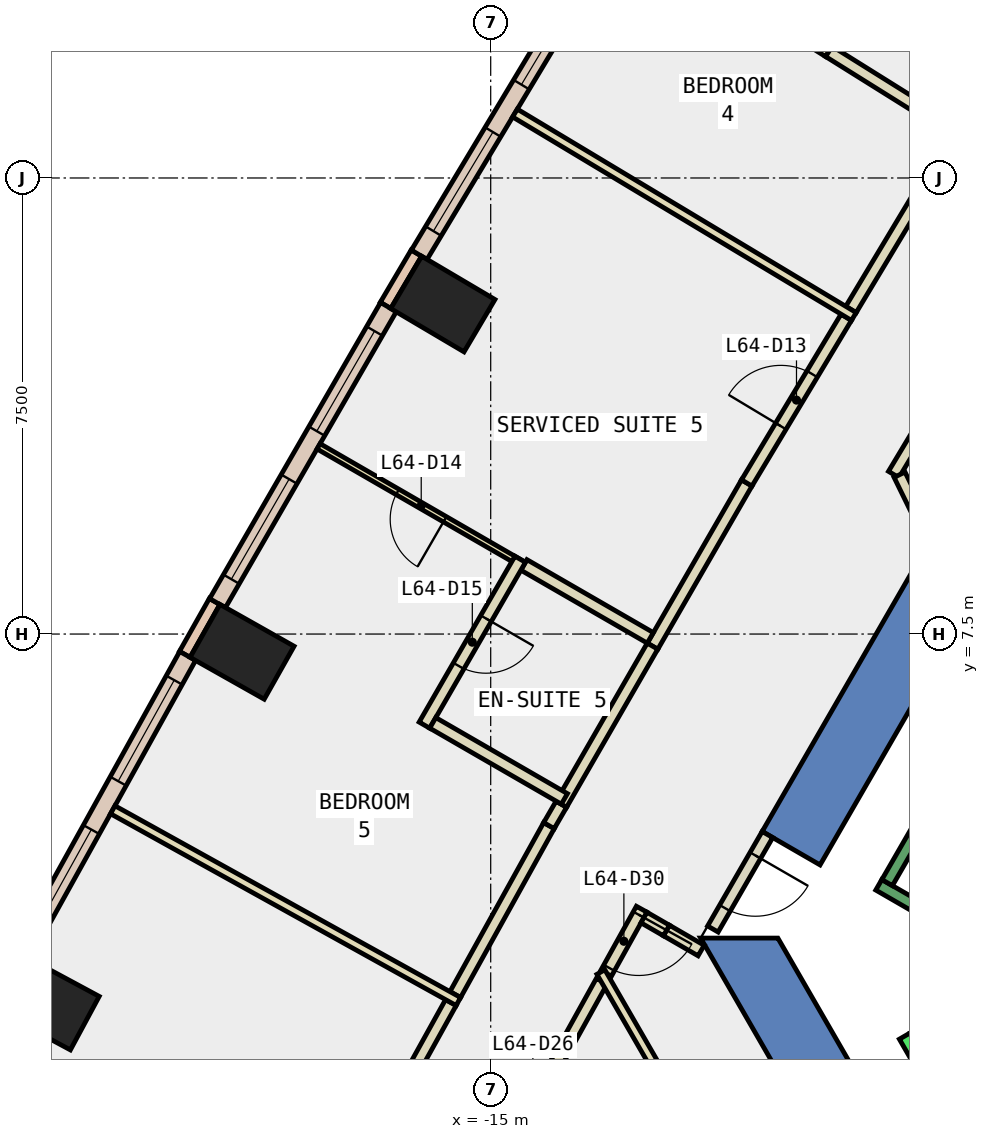
"""IFC4 building model, lengths in metres.
Left out: names, types, materials, properties, quantities, classifications, styles, units other than length and angle.
Written with IfcOpenShell. Run it as: python <this file> out.ifc"""

import sys

from ifc_helpers import new_model, si_unit, direction, frame, frame_2d, origin, origin_2d, place, context, subcontext, project, spatial, polyline, rectangle, outline, extrude, element, fill, save


model = new_model("IFC4")
c1 = context("Model", 3, precision=1e-05, world=origin(), true_north=direction((0.0, 1.0)))
c2 = subcontext(c1, "Body", "Model", "MODEL_VIEW")
j1 = project(units=[si_unit("LENGTHUNIT", "METRE"), si_unit("PLANEANGLEUNIT", "RADIAN")], contexts=[c1])
p1 = place(None, origin())
s1 = spatial("IfcSite", under=j1, at=p1, CompositionType="ELEMENT")
p2 = place(p1, origin())
s2 = spatial("IfcBuilding", under=s1, at=p2, CompositionType="ELEMENT")
p3 = place(p2, frame((0.0, 0.0, 277.4)))
s3 = spatial("IfcBuildingStorey", under=s2, at=p3, CompositionType="ELEMENT", Elevation=277.4)
for number, where, z_axis, x_axis in (
    (1, (-15.787, 12.927, -0.34), (0.0, 0.0, 1.0), (0.509, 0.861, 0.0)),
    (2, (-19.089, 7.208, -0.34), (0.0, 0.0, 1.0), (0.491, 0.871, 0.0)),
    (3, (-22.292, 1.433, -0.34), (0.0, 0.0, 1.0), (0.474, 0.881, 0.0)),
):
    element("IfcColumn", number, at=place(p3, frame(where, z_axis=z_axis, x_axis=x_axis)), inside=s3, PredefinedType="COLUMN", context=c2, shape_type="SweptSolid", body=[
        extrude(rectangle(XDim=1.0, YDim=1.4, at=origin_2d()), origin(), (0.0, 0.0, 1.0), 3.34),
    ])
p4 = place(p3, frame((0.0, 0.0, -0.34)))
e4 = element("IfcWall", 4, at=p4, inside=s3, PredefinedType="SHEAR", context=c2, shape_type="SweptSolid", body=[
    extrude(outline(polyline([(-10.535, 4.253), (-9.583, 3.703), (-5.138, 11.4), (-5.774, 12.5), (-10.535, 4.253)])), origin(), (0.0, 0.0, 1.0), 3.34),
])
p5 = place(p3, frame((0.0, 0.0, -0.34)))
e5 = element("IfcWall", 5, at=p5, inside=s3, PredefinedType="SHEAR", context=c2, shape_type="SweptSolid", body=[
    extrude(outline(polyline([(-11.547, 2.5), (-5.774, -7.5), (-5.138, -6.4), (-10.277, 2.5), (-11.547, 2.5)])), origin(), (0.0, 0.0, 1.0), 3.34),
])
p6 = place(p3, frame((-16.222, 13.765, 0.0), z_axis=(0.0, 0.0, 1.0), x_axis=(-0.508268432768, -0.861198699634, 0.0)))
e6 = element("IfcWall", 6, at=p6, inside=s3, PredefinedType="STANDARD", context=c2, shape_type="SweptSolid", body=[
    extrude(rectangle(XDim=1.0, YDim=0.2, at=frame_2d((0.5, 0.0))), origin(), (0.0, 0.0, 1.0), 3.0),
])
p7 = place(p3, frame((-19.54, 8.036, 0.0), z_axis=(0.0, 0.0, 1.0), x_axis=(-0.491848119507, -0.870681013539, 0.0)))
e7 = element("IfcWall", 7, at=p7, inside=s3, PredefinedType="STANDARD", context=c2, shape_type="SweptSolid", body=[
    extrude(rectangle(XDim=1.0, YDim=0.2, at=frame_2d((0.5, 0.0))), origin(), (0.0, 0.0, 1.0), 3.0),
])
p8 = place(p3, frame((-13.282, 18.554, 0.0), z_axis=(0.0, 0.0, 1.0), x_axis=(-0.515006791362, -0.857186096977, 0.0)))
e8 = element("IfcWall", 8, at=p8, inside=s3, PredefinedType="STANDARD", context=c2, shape_type="SweptSolid", body=[
    extrude(rectangle(XDim=5.619, YDim=0.3, at=frame_2d((2.81, 0.0))), origin(), (0.0, 0.0, 1.0), 3.0),
])
p9 = place(p8, frame((0.455, 0.0, 0.9)))
e9 = element("IfcOpeningElement", 9, at=p9, cuts=e8, PredefinedType="OPENING", context=c2, shape_type="SweptSolid", body=[
    extrude(rectangle(XDim=1.9, YDim=2.0, at=frame_2d((0.95, 1.0))), frame((0.0, 0.16, 0.0), z_axis=(0.0, -1.0, 0.0), x_axis=(1.0, 0.0, 0.0)), (0.0, 0.0, 1.0), 0.32),
])
p10 = place(p8, frame((3.265, 0.0, 0.9)))
e10 = element("IfcOpeningElement", 10, at=p10, cuts=e8, PredefinedType="OPENING", context=c2, shape_type="SweptSolid", body=[
    extrude(rectangle(XDim=1.9, YDim=2.0, at=frame_2d((0.95, 1.0))), frame((0.0, 0.16, 0.0), z_axis=(0.0, -1.0, 0.0), x_axis=(1.0, 0.0, 0.0)), (0.0, 0.0, 1.0), 0.32),
])
p11 = place(p3, frame((-16.682, 12.877, 0.0), z_axis=(0.0, 0.0, 1.0), x_axis=(-0.49999685976, -0.866027216796, 0.0)))
e11 = element("IfcWall", 11, at=p11, inside=s3, PredefinedType="STANDARD", context=c2, shape_type="SweptSolid", body=[
    extrude(rectangle(XDim=5.622, YDim=0.3, at=frame_2d((2.811, 0.0))), origin(), (0.0, 0.0, 1.0), 3.0),
])
p12 = place(p11, frame((0.456, 0.0, 0.9)))
e12 = element("IfcOpeningElement", 12, at=p12, cuts=e11, PredefinedType="OPENING", context=c2, shape_type="SweptSolid", body=[
    extrude(rectangle(XDim=1.9, YDim=2.0, at=frame_2d((0.95, 1.0))), frame((0.0, 0.16, 0.0), z_axis=(0.0, -1.0, 0.0), x_axis=(1.0, 0.0, 0.0)), (0.0, 0.0, 1.0), 0.32),
])
p13 = place(p11, frame((3.267, 0.0, 0.9)))
e13 = element("IfcOpeningElement", 13, at=p13, cuts=e11, PredefinedType="OPENING", context=c2, shape_type="SweptSolid", body=[
    extrude(rectangle(XDim=1.9, YDim=2.0, at=frame_2d((0.95, 1.0))), frame((0.0, 0.16, 0.0), z_axis=(0.0, -1.0, 0.0), x_axis=(1.0, 0.0, 0.0)), (0.0, 0.0, 1.0), 0.32),
])
p14 = place(p3, frame((-19.984, 7.14, 0.0), z_axis=(0.0, 0.0, 1.0), x_axis=(-0.485049005017, -0.874486971162, 0.0)))
e14 = element("IfcWall", 14, at=p14, inside=s3, PredefinedType="STANDARD", context=c2, shape_type="SweptSolid", body=[
    extrude(rectangle(XDim=5.62, YDim=0.3, at=frame_2d((2.81, 0.0))), origin(), (0.0, 0.0, 1.0), 3.0),
])
p15 = place(p14, frame((0.455, 0.0, 0.9)))
e15 = element("IfcOpeningElement", 15, at=p15, cuts=e14, PredefinedType="OPENING", context=c2, shape_type="SweptSolid", body=[
    extrude(rectangle(XDim=1.9, YDim=2.0, at=frame_2d((0.95, 1.0))), frame((0.0, 0.16, 0.0), z_axis=(0.0, -1.0, 0.0), x_axis=(1.0, 0.0, 0.0)), (0.0, 0.0, 1.0), 0.32),
])
p16 = place(p14, frame((3.265, 0.0, 0.9)))
e16 = element("IfcOpeningElement", 16, at=p16, cuts=e14, PredefinedType="OPENING", context=c2, shape_type="SweptSolid", body=[
    extrude(rectangle(XDim=1.9, YDim=2.0, at=frame_2d((0.95, 1.0))), frame((0.0, 0.16, 0.0), z_axis=(0.0, -1.0, 0.0), x_axis=(1.0, 0.0, 0.0)), (0.0, 0.0, 1.0), 0.32),
])
p17 = place(p3, frame((-11.539, 2.295, 0.0), z_axis=(0.0, 0.0, 1.0), x_axis=(-0.86577241902, 0.500437926684, 0.0)))
e17 = element("IfcWall", 17, at=p17, inside=s3, PredefinedType="PARTITIONING", context=c2, shape_type="SweptSolid", body=[
    extrude(rectangle(XDim=0.66, YDim=0.2, at=frame_2d((0.33, 0.0))), origin(), (0.0, 0.0, 1.0), 2.4),
])
p18 = place(p3, frame((-12.517, 2.975, 0.0), z_axis=(0.0, 0.0, 1.0), x_axis=(-0.485195833999, -0.87440551386, 0.0)))
e18 = element("IfcWall", 18, at=p18, inside=s3, PredefinedType="PARTITIONING", context=c2, shape_type="SweptSolid", body=[
    extrude(rectangle(XDim=1.206, YDim=0.2, at=frame_2d((0.603, 0.0))), origin(), (0.0, 0.0, 1.0), 3.0),
])
p19 = place(p18, frame((0.103, 0.0, 0.0)))
e19 = element("IfcOpeningElement", 19, at=p19, cuts=e18, PredefinedType="OPENING", context=c2, shape_type="SweptSolid", body=[
    extrude(rectangle(XDim=1.0, YDim=2.1, at=frame_2d((0.5, 1.05))), frame((0.0, 0.11, 0.0), z_axis=(0.0, -1.0, 0.0), x_axis=(1.0, 0.0, 0.0)), (0.0, 0.0, 1.0), 0.22),
])
p20 = place(p3, frame((-5.885, 14.264, 0.0), z_axis=(0.0, 0.0, 1.0), x_axis=(-0.514971458129, -0.857207324579, 0.0)))
e20 = element("IfcWall", 20, at=p20, inside=s3, PredefinedType="PARTITIONING", context=c2, shape_type="SweptSolid", body=[
    extrude(rectangle(XDim=4.83, YDim=0.2, at=frame_2d((2.415, 0.0))), origin(), (0.0, 0.0, 1.0), 3.0),
])
p21 = place(p20, frame((1.915, 0.0, 0.0)))
e21 = element("IfcOpeningElement", 21, at=p21, cuts=e20, PredefinedType="OPENING", context=c2, shape_type="SweptSolid", body=[
    extrude(rectangle(XDim=1.0, YDim=2.1, at=frame_2d((0.5, 1.05))), frame((0.0, 0.11, 0.0), z_axis=(0.0, -1.0, 0.0), x_axis=(1.0, 0.0, 0.0)), (0.0, 0.0, 1.0), 0.22),
])
p22 = place(p3, frame((-8.276, 10.12, 0.0), z_axis=(0.0, 0.0, 1.0), x_axis=(0.440226122236, -0.897886942382, 0.0)))
e22 = element("IfcWall", 22, at=p22, inside=s3, PredefinedType="PARTITIONING", context=c2, shape_type="SweptSolid", body=[
    extrude(rectangle(XDim=1.176, YDim=0.2, at=frame_2d((0.588, 0.0))), origin(), (0.0, 0.0, 1.0), 3.0),
])
p23 = place(p3, frame((-13.174, 1.79, 0.0), z_axis=(0.0, 0.0, 1.0), x_axis=(-0.485079003918, -0.874470331091, 0.0)))
e23 = element("IfcWall", 23, at=p23, inside=s3, PredefinedType="PARTITIONING", context=c2, shape_type="SweptSolid", body=[
    extrude(rectangle(XDim=4.669, YDim=0.2, at=frame_2d((2.334, 0.0))), origin(), (0.0, 0.0, 1.0), 3.0),
])
p24 = place(p23, frame((1.834, 0.0, 0.0)))
e24 = element("IfcOpeningElement", 24, at=p24, cuts=e23, PredefinedType="OPENING", context=c2, shape_type="SweptSolid", body=[
    extrude(rectangle(XDim=1.0, YDim=2.1, at=frame_2d((0.5, 1.05))), frame((0.0, 0.11, 0.0), z_axis=(0.0, -1.0, 0.0), x_axis=(1.0, 0.0, 0.0)), (0.0, 0.0, 1.0), 0.22),
])
p25 = place(p3, frame((-9.075, 12.837, 0.0), z_axis=(0.0, 0.0, 1.0), x_axis=(0.514620055475, 0.857418333431, 0.0)))
e25 = element("IfcWall", 25, at=p25, inside=s3, PredefinedType="PARTITIONING", context=c2, shape_type="SweptSolid", body=[
    extrude(rectangle(XDim=3.177, YDim=0.2, at=frame_2d((1.588, 0.0))), origin(), (0.0, 0.0, 1.0), 3.0),
])
p26 = place(p3, frame((-12.338, 7.3, 0.0), z_axis=(0.0, 0.0, 1.0), x_axis=(0.4996633593, 0.866219676164, 0.0)))
e26 = element("IfcWall", 26, at=p26, inside=s3, PredefinedType="PARTITIONING", context=c2, shape_type="SweptSolid", body=[
    extrude(rectangle(XDim=3.1, YDim=0.2, at=frame_2d((1.55, 0.0))), origin(), (0.0, 0.0, 1.0), 3.0),
])
p27 = place(p3, frame((-10.789, 9.985, 0.0), z_axis=(0.0, 0.0, 1.0), x_axis=(0.51487988517, 0.857262330823, 0.0)))
e27 = element("IfcWall", 27, at=p27, inside=s3, PredefinedType="PARTITIONING", context=c2, shape_type="SweptSolid", body=[
    extrude(rectangle(XDim=3.177, YDim=0.2, at=frame_2d((1.589, 0.0))), origin(), (0.0, 0.0, 1.0), 3.0),
])
p28 = place(p27, frame((1.089, 0.0, 0.0)))
e28 = element("IfcOpeningElement", 28, at=p28, cuts=e27, PredefinedType="OPENING", context=c2, shape_type="SweptSolid", body=[
    extrude(rectangle(XDim=1.0, YDim=2.1, at=frame_2d((0.5, 1.05))), frame((0.0, 0.11, 0.0), z_axis=(0.0, -1.0, 0.0), x_axis=(1.0, 0.0, 0.0)), (0.0, 0.0, 1.0), 0.22),
])
p29 = place(p3, frame((-15.583, 1.571, 0.0), z_axis=(0.0, 0.0, 1.0), x_axis=(0.484944791944, 0.874544766588, 0.0)))
e29 = element("IfcWall", 29, at=p29, inside=s3, PredefinedType="PARTITIONING", context=c2, shape_type="SweptSolid", body=[
    extrude(rectangle(XDim=3.178, YDim=0.2, at=frame_2d((1.589, 0.0))), origin(), (0.0, 0.0, 1.0), 3.0),
])
p30 = place(p3, frame((-14.042, 4.35, 0.0), z_axis=(0.0, 0.0, 1.0), x_axis=(0.501816902032, 0.864973870608, 0.0)))
e30 = element("IfcWall", 30, at=p30, inside=s3, PredefinedType="PARTITIONING", context=c2, shape_type="SweptSolid", body=[
    extrude(rectangle(XDim=0.407, YDim=0.2, at=frame_2d((0.203, 0.0))), origin(), (0.0, 0.0, 1.0), 3.0),
])
p31 = place(p3, frame((-13.838, 4.702, 0.0), z_axis=(0.0, 0.0, 1.0), x_axis=(0.499543983968, 0.866288524731, 0.0)))
e31 = element("IfcWall", 31, at=p31, inside=s3, PredefinedType="PARTITIONING", context=c2, shape_type="SweptSolid", body=[
    extrude(rectangle(XDim=3.0, YDim=0.2, at=frame_2d((1.5, 0.0))), origin(), (0.0, 0.0, 1.0), 3.0),
])
p32 = place(p3, frame((-17.196, -1.338, 0.0), z_axis=(0.0, 0.0, 1.0), x_axis=(0.485107756493, 0.87445438108, 0.0)))
e32 = element("IfcWall", 32, at=p32, inside=s3, PredefinedType="PARTITIONING", context=c2, shape_type="SweptSolid", body=[
    extrude(rectangle(XDim=3.177, YDim=0.2, at=frame_2d((1.588, 0.0))), origin(), (0.0, 0.0, 1.0), 3.0),
])
p33 = place(p3, frame((-13.188, 1.942, 0.0), z_axis=(0.0, 0.0, 1.0), x_axis=(0.500061177503, -0.865990080056, 0.0)))
e33 = element("IfcWall", 33, at=p33, inside=s3, PredefinedType="PARTITIONING", context=c2, shape_type="SweptSolid", body=[
    extrude(rectangle(XDim=6.447, YDim=0.15, at=frame_2d((3.224, 0.0))), origin(), (0.0, 0.0, 1.0), 3.0),
])
p34 = place(p3, frame((-7.907, 19.72, 0.0), z_axis=(0.0, 0.0, 1.0), x_axis=(-0.529915322147, -0.848050559433, 0.0)))
e34 = element("IfcWall", 34, at=p34, inside=s3, PredefinedType="PARTITIONING", context=c2, shape_type="SweptSolid", body=[
    extrude(rectangle(XDim=3.149, YDim=0.2, at=frame_2d((1.575, 0.0))), origin(), (0.0, 0.0, 1.0), 3.0),
])
p35 = place(p34, frame((1.125, 0.0, 0.0)))
e35 = element("IfcOpeningElement", 35, at=p35, cuts=e34, PredefinedType="OPENING", context=c2, shape_type="SweptSolid", body=[
    extrude(rectangle(XDim=0.9, YDim=2.1, at=frame_2d((0.45, 1.05))), frame((0.0, 0.11, 0.0), z_axis=(0.0, -1.0, 0.0), x_axis=(1.0, 0.0, 0.0)), (0.0, 0.0, 1.0), 0.22),
])
p36 = place(p3, frame((-9.438, 17.081, 0.0), z_axis=(0.0, 0.0, 1.0), x_axis=(0.847992817371, -0.530007718516, 0.0)))
e36 = element("IfcWall", 36, at=p36, inside=s3, PredefinedType="PARTITIONING", context=c2, shape_type="SweptSolid", body=[
    extrude(rectangle(XDim=2.5, YDim=0.2, at=frame_2d((1.25, 0.0))), origin(), (0.0, 0.0, 1.0), 3.0),
])
p37 = place(p3, frame((-9.028, 12.722, 0.0), z_axis=(0.0, 0.0, 1.0), x_axis=(-0.857330501016, 0.514766366449, 0.0)))
e37 = element("IfcWall", 37, at=p37, inside=s3, PredefinedType="PARTITIONING", context=c2, shape_type="SweptSolid", body=[
    extrude(rectangle(XDim=6.5, YDim=0.15, at=frame_2d((3.25, 0.0))), origin(), (0.0, 0.0, 1.0), 3.0),
])
p38 = place(p3, frame((-14.454, 8.637, 0.0), z_axis=(0.0, 0.0, 1.0), x_axis=(-0.865995823051, 0.500051231833, 0.0)))
e38 = element("IfcWall", 38, at=p38, inside=s3, PredefinedType="PARTITIONING", context=c2, shape_type="SweptSolid", body=[
    extrude(rectangle(XDim=3.899, YDim=0.1, at=frame_2d((1.95, 0.0))), origin(), (0.0, 0.0, 1.0), 3.0),
])
p39 = place(p38, frame((1.5, 0.0, 0.0)))
e39 = element("IfcOpeningElement", 39, at=p39, cuts=e38, PredefinedType="OPENING", context=c2, shape_type="SweptSolid", body=[
    extrude(rectangle(XDim=0.9, YDim=2.1, at=frame_2d((0.45, 1.05))), frame((0.0, 0.06, 0.0), z_axis=(0.0, -1.0, 0.0), x_axis=(1.0, 0.0, 0.0)), (0.0, 0.0, 1.0), 0.12),
])
p40 = place(p3, frame((-12.375, 7.437, 0.0), z_axis=(0.0, 0.0, 1.0), x_axis=(-0.866100915363, 0.499869187296, 0.0)))
e40 = element("IfcWall", 40, at=p40, inside=s3, PredefinedType="PARTITIONING", context=c2, shape_type="SweptSolid", body=[
    extrude(rectangle(XDim=2.401, YDim=0.2, at=frame_2d((1.2, 0.0))), origin(), (0.0, 0.0, 1.0), 3.0),
])
p41 = place(p3, frame((-14.515, 8.73, 0.0), z_axis=(0.0, 0.0, 1.0), x_axis=(-0.500039995618, -0.866002311072, 0.0)))
e41 = element("IfcWall", 41, at=p41, inside=s3, PredefinedType="PARTITIONING", context=c2, shape_type="SweptSolid", body=[
    extrude(rectangle(XDim=3.15, YDim=0.2, at=frame_2d((1.575, 0.0))), origin(), (0.0, 0.0, 1.0), 3.0),
])
p42 = place(p41, frame((1.125, 0.0, 0.0)))
e42 = element("IfcOpeningElement", 42, at=p42, cuts=e41, PredefinedType="OPENING", context=c2, shape_type="SweptSolid", body=[
    extrude(rectangle(XDim=0.9, YDim=2.1, at=frame_2d((0.45, 1.05))), frame((0.0, 0.11, 0.0), z_axis=(0.0, -1.0, 0.0), x_axis=(1.0, 0.0, 0.0)), (0.0, 0.0, 1.0), 0.22),
])
p43 = place(p3, frame((-15.953, 6.039, 0.0), z_axis=(0.0, 0.0, 1.0), x_axis=(0.865998541277, -0.500046524342, 0.0)))
e43 = element("IfcWall", 43, at=p43, inside=s3, PredefinedType="PARTITIONING", context=c2, shape_type="SweptSolid", body=[
    extrude(rectangle(XDim=2.5, YDim=0.2, at=frame_2d((1.25, 0.0))), origin(), (0.0, 0.0, 1.0), 3.0),
])
p44 = place(p3, frame((-15.532, 1.457, 0.0), z_axis=(0.0, 0.0, 1.0), x_axis=(-0.874467143452, 0.485084750351, 0.0)))
e44 = element("IfcWall", 44, at=p44, inside=s3, PredefinedType="PARTITIONING", context=c2, shape_type="SweptSolid", body=[
    extrude(rectangle(XDim=6.5, YDim=0.15, at=frame_2d((3.25, 0.0))), origin(), (0.0, 0.0, 1.0), 3.0),
])
p45 = place(p3, frame((-10.449, 4.203, 0.0), z_axis=(0.0, 0.0, 1.0), x_axis=(-0.499914839587, -0.866074565589, 0.0)))
e45 = element("IfcWall", 45, at=p45, inside=s3, PredefinedType="PARTITIONING", context=c2, shape_type="SweptSolid", body=[
    extrude(rectangle(XDim=1.794, YDim=0.2, at=frame_2d((0.897, 0.0))), origin(), (0.0, 0.0, 1.0), 2.4),
])
p46 = place(p45, frame((0.397, 0.0, 0.0)))
e46 = element("IfcOpeningElement", 46, at=p46, cuts=e45, PredefinedType="OPENING", context=c2, shape_type="SweptSolid", body=[
    extrude(rectangle(XDim=1.0, YDim=2.1, at=frame_2d((0.5, 1.05))), frame((0.0, 0.11, 0.0), z_axis=(0.0, -1.0, 0.0), x_axis=(1.0, 0.0, 0.0)), (0.0, 0.0, 1.0), 0.22),
])
p47 = place(p3, frame((-12.11, 2.625, 0.0), z_axis=(0.0, 0.0, 1.0), x_axis=(-0.86611877815, 0.499838235968, 0.0)))
e47 = element("IfcWall", 47, at=p47, inside=s3, PredefinedType="PARTITIONING", context=c2, shape_type="SweptSolid", body=[
    extrude(rectangle(XDim=0.426, YDim=0.2, at=frame_2d((0.213, 0.0))), origin(), (0.0, 0.0, 1.0), 3.0),
])
p48 = place(p3, frame((-8.192, 0.888, 0.0), z_axis=(0.0, 0.0, 1.0), x_axis=(0.500034260056, -0.866005622828, 0.0)))
e48 = element("IfcWall", 48, at=p48, inside=s3, PredefinedType="STANDARD", context=c2, shape_type="SweptSolid", body=[
    extrude(rectangle(XDim=5.399, YDim=0.2, at=frame_2d((2.7, 0.0))), origin(), (0.0, 0.0, 1.0), 3.0),
])
p49 = place(p3, frame((-6.25, 2.01, 0.0), z_axis=(0.0, 0.0, 1.0), x_axis=(-0.86611865017, 0.499838457731, 0.0)))
e49 = element("IfcWall", 49, at=p49, inside=s3, PredefinedType="STANDARD", context=c2, shape_type="SweptSolid", body=[
    extrude(rectangle(XDim=2.733, YDim=0.2, at=frame_2d((1.366, 0.0))), origin(), (0.0, 0.0, 1.0), 3.0),
])
p50 = place(p3, frame((-5.03, 9.388, 0.0), z_axis=(0.0, 0.0, 1.0), x_axis=(-0.499978703459, -0.866037698999, 0.0)))
e50 = element("IfcWall", 50, at=p50, inside=s3, PredefinedType="STANDARD", context=c2, shape_type="SweptSolid", body=[
    extrude(rectangle(XDim=6.9, YDim=0.2, at=frame_2d((3.45, 0.0))), origin(), (0.0, 0.0, 1.0), 3.0),
])
p51 = place(p9, origin())
e51 = element("IfcWindow", 51, at=p51, inside=s3, PartitioningType="SINGLE_PANEL", PredefinedType="WINDOW", context=c2, shape_type="SweptSolid", body=[
    extrude(rectangle(XDim=1.9, YDim=2.0, at=frame_2d((0.95, 1.0))), frame((0.0, 0.03, 0.0), z_axis=(0.0, -1.0, 0.0), x_axis=(1.0, 0.0, 0.0)), (0.0, 0.0, 1.0), 0.06),
])
fill(e9, e51)
p52 = place(p10, origin())
e52 = element("IfcWindow", 52, at=p52, inside=s3, PartitioningType="SINGLE_PANEL", PredefinedType="WINDOW", context=c2, shape_type="SweptSolid", body=[
    extrude(rectangle(XDim=1.9, YDim=2.0, at=frame_2d((0.95, 1.0))), frame((0.0, 0.03, 0.0), z_axis=(0.0, -1.0, 0.0), x_axis=(1.0, 0.0, 0.0)), (0.0, 0.0, 1.0), 0.06),
])
fill(e10, e52)
p53 = place(p12, origin())
e53 = element("IfcWindow", 53, at=p53, inside=s3, PartitioningType="SINGLE_PANEL", PredefinedType="WINDOW", context=c2, shape_type="SweptSolid", body=[
    extrude(rectangle(XDim=1.9, YDim=2.0, at=frame_2d((0.95, 1.0))), frame((0.0, 0.03, 0.0), z_axis=(0.0, -1.0, 0.0), x_axis=(1.0, 0.0, 0.0)), (0.0, 0.0, 1.0), 0.06),
])
fill(e12, e53)
p54 = place(p13, origin())
e54 = element("IfcWindow", 54, at=p54, inside=s3, PartitioningType="SINGLE_PANEL", PredefinedType="WINDOW", context=c2, shape_type="SweptSolid", body=[
    extrude(rectangle(XDim=1.9, YDim=2.0, at=frame_2d((0.95, 1.0))), frame((0.0, 0.03, 0.0), z_axis=(0.0, -1.0, 0.0), x_axis=(1.0, 0.0, 0.0)), (0.0, 0.0, 1.0), 0.06),
])
fill(e13, e54)
p55 = place(p15, origin())
e55 = element("IfcWindow", 55, at=p55, inside=s3, PartitioningType="SINGLE_PANEL", PredefinedType="WINDOW", context=c2, shape_type="SweptSolid", body=[
    extrude(rectangle(XDim=1.9, YDim=2.0, at=frame_2d((0.95, 1.0))), frame((0.0, 0.03, 0.0), z_axis=(0.0, -1.0, 0.0), x_axis=(1.0, 0.0, 0.0)), (0.0, 0.0, 1.0), 0.06),
])
fill(e15, e55)
p56 = place(p16, origin())
e56 = element("IfcWindow", 56, at=p56, inside=s3, PartitioningType="SINGLE_PANEL", PredefinedType="WINDOW", context=c2, shape_type="SweptSolid", body=[
    extrude(rectangle(XDim=1.9, YDim=2.0, at=frame_2d((0.95, 1.0))), frame((0.0, 0.03, 0.0), z_axis=(0.0, -1.0, 0.0), x_axis=(1.0, 0.0, 0.0)), (0.0, 0.0, 1.0), 0.06),
])
fill(e16, e56)
p57 = place(p28, origin())
e57 = element("IfcDoor", 57, at=p57, inside=s3, OperationType="SINGLE_SWING_RIGHT", PredefinedType="DOOR", context=c2, shape_type="SweptSolid", body=[
    extrude(rectangle(XDim=1.0, YDim=2.1, at=frame_2d((0.5, 1.05))), frame((0.0, 0.025, 0.0), z_axis=(0.0, -1.0, 0.0), x_axis=(1.0, 0.0, 0.0)), (0.0, 0.0, 1.0), 0.05),
])
fill(e28, e57)
p58 = place(p39, origin())
e58 = element("IfcDoor", 58, at=p58, inside=s3, OperationType="SINGLE_SWING_LEFT", PredefinedType="DOOR", context=c2, shape_type="SweptSolid", body=[
    extrude(rectangle(XDim=0.9, YDim=2.1, at=frame_2d((0.45, 1.05))), frame((0.0, 0.025, 0.0), z_axis=(0.0, -1.0, 0.0), x_axis=(1.0, 0.0, 0.0)), (0.0, 0.0, 1.0), 0.05),
])
fill(e39, e58)
p59 = place(p42, origin())
e59 = element("IfcDoor", 59, at=p59, inside=s3, OperationType="SINGLE_SWING_LEFT", PredefinedType="DOOR", context=c2, shape_type="SweptSolid", body=[
    extrude(rectangle(XDim=0.9, YDim=2.1, at=frame_2d((0.45, 1.05))), frame((0.0, 0.025, 0.0), z_axis=(0.0, -1.0, 0.0), x_axis=(1.0, 0.0, 0.0)), (0.0, 0.0, 1.0), 0.05),
])
fill(e42, e59)
p60 = place(p19, origin())
e60 = element("IfcDoor", 60, at=p60, inside=s3, OperationType="SINGLE_SWING_RIGHT", PredefinedType="DOOR", context=c2, shape_type="SweptSolid", body=[
    extrude(rectangle(XDim=1.0, YDim=2.1, at=frame_2d((0.5, 1.05))), frame((0.0, 0.025, 0.0), z_axis=(0.0, -1.0, 0.0), x_axis=(1.0, 0.0, 0.0)), (0.0, 0.0, 1.0), 0.05),
])
fill(e19, e60)
p61 = place(p46, origin())
e61 = element("IfcDoor", 61, at=p61, inside=s3, OperationType="SINGLE_SWING_LEFT", PredefinedType="DOOR", context=c2, shape_type="SweptSolid", body=[
    extrude(rectangle(XDim=1.0, YDim=2.1, at=frame_2d((0.5, 1.05))), frame((0.0, 0.025, 0.0), z_axis=(0.0, -1.0, 0.0), x_axis=(1.0, 0.0, 0.0)), (0.0, 0.0, 1.0), 0.05),
])
fill(e46, e61)
save(model, sys.argv[1])
